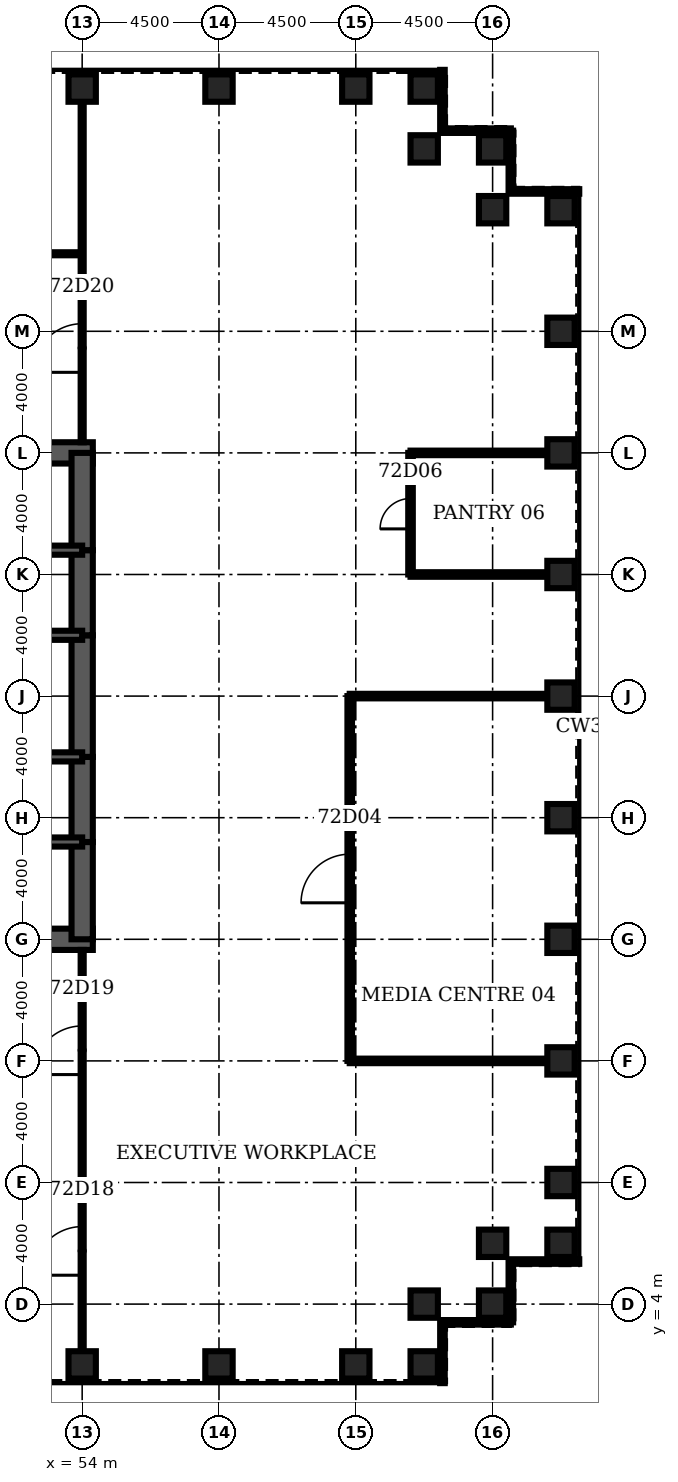
"""IFC4 building model, lengths in metres.
Left out: names, types, materials, properties, quantities, classifications, styles, units other than length and angle.
Written with IfcOpenShell. Run it as: python <this file> out.ifc"""

import sys

from ifc_helpers import new_model, si_unit, direction, frame, frame_2d, origin, origin_2d, place, context, subcontext, project, spatial, rectangle, hollow_rectangle, extrude, element, fill, save


model = new_model("IFC4")
c1 = context("Model", 3, precision=1e-05, world=origin(), true_north=direction((0.0, 1.0)))
c2 = subcontext(c1, "Body", "Model", "MODEL_VIEW")
j1 = project(units=[si_unit("LENGTHUNIT", "METRE"), si_unit("PLANEANGLEUNIT", "RADIAN")], contexts=[c1])
p1 = place(None, origin())
s1 = spatial("IfcSite", under=j1, at=p1, CompositionType="ELEMENT")
p2 = place(p1, origin())
s2 = spatial("IfcBuilding", under=s1, at=p2, CompositionType="ELEMENT")
p3 = place(p2, frame((0.0, 0.0, 317.3)))
s3 = spatial("IfcBuildingStorey", under=s2, at=p3, CompositionType="ELEMENT", Elevation=317.3)
for number, where, z_axis, x_axis in (
    (1, (54.0, 2.0, 0.0), (0.0, 0.0, 1.0), (0.0, 1.0, 0.0)),
    (2, (58.5, 2.0, 0.0), (0.0, 0.0, 1.0), (0.0, 1.0, 0.0)),
    (3, (63.0, 2.0, 0.0), (0.0, 0.0, 1.0), (0.0, 1.0, 0.0)),
    (4, (65.25, 2.0, 0.0), (0.0, 0.0, 1.0), (0.0, 1.0, 0.0)),
    (5, (65.25, 4.0, 0.0), (0.0, 0.0, 1.0), (0.0, 1.0, 0.0)),
    (6, (67.5, 4.0, 0.0), (0.0, 0.0, 1.0), (1.0, 0.0, 0.0)),
    (7, (67.5, 6.0, 0.0), (0.0, 0.0, 1.0), (1.0, 0.0, 0.0)),
    (8, (69.75, 6.0, 0.0), (0.0, 0.0, 1.0), (1.0, 0.0, 0.0)),
    (9, (69.75, 8.0, 0.0), (0.0, 0.0, 1.0), (1.0, 0.0, 0.0)),
    (10, (69.75, 12.0, 0.0), (0.0, 0.0, 1.0), (1.0, 0.0, 0.0)),
    (11, (69.75, 16.0, 0.0), (0.0, 0.0, 1.0), (1.0, 0.0, 0.0)),
    (12, (69.75, 20.0, 0.0), (0.0, 0.0, 1.0), (1.0, 0.0, 0.0)),
    (13, (69.75, 24.0, 0.0), (0.0, 0.0, 1.0), (1.0, 0.0, 0.0)),
    (14, (69.75, 28.0, 0.0), (0.0, 0.0, 1.0), (1.0, 0.0, 0.0)),
    (15, (69.75, 32.0, 0.0), (0.0, 0.0, 1.0), (1.0, 0.0, 0.0)),
    (16, (69.75, 36.0, 0.0), (0.0, 0.0, 1.0), (1.0, 0.0, 0.0)),
    (17, (69.75, 40.0, 0.0), (0.0, 0.0, 1.0), (1.0, 0.0, 0.0)),
    (18, (67.5, 40.0, 0.0), (0.0, 0.0, 1.0), (1.0, 0.0, 0.0)),
    (19, (67.5, 42.0, 0.0), (0.0, 0.0, 1.0), (1.0, 0.0, 0.0)),
    (20, (65.25, 42.0, 0.0), (0.0, 0.0, 1.0), (0.0, 1.0, 0.0)),
    (21, (65.25, 44.0, 0.0), (0.0, 0.0, 1.0), (0.0, 1.0, 0.0)),
    (22, (63.0, 44.0, 0.0), (0.0, 0.0, 1.0), (0.0, 1.0, 0.0)),
    (23, (58.5, 44.0, 0.0), (0.0, 0.0, 1.0), (0.0, 1.0, 0.0)),
    (24, (54.0, 44.0, 0.0), (0.0, 0.0, 1.0), (0.0, 1.0, 0.0)),
):
    element("IfcColumn", number, at=place(p3, frame(where, z_axis=z_axis, x_axis=x_axis)), inside=s3, PredefinedType="COLUMN", context=c2, shape_type="SweptSolid", body=[
        extrude(hollow_rectangle(XDim=0.9, YDim=0.9, WallThickness=0.05, at=origin_2d()), origin(), (0.0, 0.0, 1.0), 4.2),
    ])
for number, where, z_axis, x_axis in (
    (25, (45.0, 16.0, 0.0), (0.0, 0.0, 1.0), (1.0, 0.0, 0.0)),
    (26, (54.35, 32.0, 0.0), (0.0, 0.0, 1.0), (-1.0, 0.0, 0.0)),
):
    element("IfcWall", number, at=place(p3, frame(where, z_axis=z_axis, x_axis=x_axis)), inside=s3, PredefinedType="SHEAR", context=c2, shape_type="SweptSolid", body=[
        extrude(rectangle(XDim=9.35, YDim=0.7, at=frame_2d((4.675, 0.0))), origin(), (0.0, 0.0, 1.0), 4.2),
    ])
p4 = place(p3, frame((54.0, 16.0, 0.0), z_axis=(0.0, 0.0, 1.0), x_axis=(0.0, 1.0, 0.0)))
e27 = element("IfcWall", 27, at=p4, inside=s3, PredefinedType="SHEAR", context=c2, shape_type="SweptSolid", body=[
    extrude(rectangle(XDim=3.2, YDim=0.7, at=frame_2d((1.6, 0.0))), origin(), (0.0, 0.0, 1.0), 4.2),
])
p5 = place(p3, frame((54.0, 19.2, 0.0), z_axis=(0.0, 0.0, 1.0), x_axis=(0.0, 1.0, 0.0)))
e28 = element("IfcWall", 28, at=p5, inside=s3, PredefinedType="SHEAR", context=c2, shape_type="SweptSolid", body=[
    extrude(rectangle(XDim=2.8, YDim=0.7, at=frame_2d((1.4, 0.0))), origin(), (0.0, 0.0, 1.0), 4.2),
])
p6 = place(p5, frame((0.4, 0.0, 0.0)))
e29 = element("IfcOpeningElement", 29, at=p6, cuts=e28, PredefinedType="OPENING", context=c2, shape_type="SweptSolid", body=[
    extrude(rectangle(XDim=1.8, YDim=2.1, at=frame_2d((0.9, 1.05))), frame((0.0, 0.36, 0.0), z_axis=(0.0, -1.0, 0.0), x_axis=(1.0, 0.0, 0.0)), (0.0, 0.0, 1.0), 0.72),
])
p7 = place(p3, frame((54.0, 22.0, 0.0), z_axis=(0.0, 0.0, 1.0), x_axis=(0.0, 1.0, 0.0)))
e30 = element("IfcWall", 30, at=p7, inside=s3, PredefinedType="SHEAR", context=c2, shape_type="SweptSolid", body=[
    extrude(rectangle(XDim=4.0, YDim=0.7, at=frame_2d((2.0, 0.0))), origin(), (0.0, 0.0, 1.0), 4.2),
])
p8 = place(p3, frame((54.0, 26.0, 0.0), z_axis=(0.0, 0.0, 1.0), x_axis=(0.0, 1.0, 0.0)))
e31 = element("IfcWall", 31, at=p8, inside=s3, PredefinedType="SHEAR", context=c2, shape_type="SweptSolid", body=[
    extrude(rectangle(XDim=2.8, YDim=0.7, at=frame_2d((1.4, 0.0))), origin(), (0.0, 0.0, 1.0), 4.2),
])
p9 = place(p8, frame((0.6, 0.0, 0.0)))
e32 = element("IfcOpeningElement", 32, at=p9, cuts=e31, PredefinedType="OPENING", context=c2, shape_type="SweptSolid", body=[
    extrude(rectangle(XDim=1.8, YDim=2.1, at=frame_2d((0.9, 1.05))), frame((0.0, 0.36, 0.0), z_axis=(0.0, -1.0, 0.0), x_axis=(1.0, 0.0, 0.0)), (0.0, 0.0, 1.0), 0.72),
])
p10 = place(p3, frame((54.0, 28.8, 0.0), z_axis=(0.0, 0.0, 1.0), x_axis=(0.0, 1.0, 0.0)))
e33 = element("IfcWall", 33, at=p10, inside=s3, PredefinedType="SHEAR", context=c2, shape_type="SweptSolid", body=[
    extrude(rectangle(XDim=3.2, YDim=0.7, at=frame_2d((1.6, 0.0))), origin(), (0.0, 0.0, 1.0), 4.2),
])
p11 = place(p3, frame((45.0, 19.2, 0.0), z_axis=(0.0, 0.0, 1.0), x_axis=(1.0, 0.0, 0.0)))
e34 = element("IfcWall", 34, at=p11, inside=s3, PredefinedType="SOLIDWALL", context=c2, shape_type="SweptSolid", body=[
    extrude(rectangle(XDim=9.0, YDim=0.3, at=frame_2d((4.5, 0.0))), origin(), (0.0, 0.0, 1.0), 4.2),
])
p12 = place(p11, frame((7.35, 0.0, 0.0)))
e35 = element("IfcOpeningElement", 35, at=p12, cuts=e34, PredefinedType="OPENING", context=c2, shape_type="SweptSolid", body=[
    extrude(rectangle(XDim=1.0, YDim=2.1, at=frame_2d((0.5, 1.05))), frame((0.0, 0.16, 0.0), z_axis=(0.0, -1.0, 0.0), x_axis=(1.0, 0.0, 0.0)), (0.0, 0.0, 1.0), 0.32),
])
p13 = place(p3, frame((45.0, 28.8, 0.0), z_axis=(0.0, 0.0, 1.0), x_axis=(1.0, 0.0, 0.0)))
e36 = element("IfcWall", 36, at=p13, inside=s3, PredefinedType="SOLIDWALL", context=c2, shape_type="SweptSolid", body=[
    extrude(rectangle(XDim=9.0, YDim=0.3, at=frame_2d((4.5, 0.0))), origin(), (0.0, 0.0, 1.0), 4.2),
])
p14 = place(p13, frame((7.35, 0.0, 0.0)))
e37 = element("IfcOpeningElement", 37, at=p14, cuts=e36, PredefinedType="OPENING", context=c2, shape_type="SweptSolid", body=[
    extrude(rectangle(XDim=1.0, YDim=2.1, at=frame_2d((0.5, 1.05))), frame((0.0, 0.16, 0.0), z_axis=(0.0, -1.0, 0.0), x_axis=(1.0, 0.0, 0.0)), (0.0, 0.0, 1.0), 0.32),
])
p15 = place(p3, frame((48.0, 22.0, 0.0), z_axis=(0.0, 0.0, 1.0), x_axis=(1.0, 0.0, 0.0)))
e38 = element("IfcWall", 38, at=p15, inside=s3, PredefinedType="SOLIDWALL", context=c2, shape_type="SweptSolid", body=[
    extrude(rectangle(XDim=6.0, YDim=0.3, at=frame_2d((3.0, 0.0))), origin(), (0.0, 0.0, 1.0), 4.2),
])
p16 = place(p15, frame((2.0, 0.0, 0.0)))
e39 = element("IfcOpeningElement", 39, at=p16, cuts=e38, PredefinedType="OPENING", context=c2, shape_type="SweptSolid", body=[
    extrude(rectangle(XDim=1.0, YDim=2.1, at=frame_2d((0.5, 1.05))), frame((0.0, 0.16, 0.0), z_axis=(0.0, -1.0, 0.0), x_axis=(1.0, 0.0, 0.0)), (0.0, 0.0, 1.0), 0.32),
])
p17 = place(p15, frame((4.1, 0.0, 0.0)))
e40 = element("IfcOpeningElement", 40, at=p17, cuts=e38, PredefinedType="OPENING", context=c2, shape_type="SweptSolid", body=[
    extrude(rectangle(XDim=1.0, YDim=2.1, at=frame_2d((0.5, 1.05))), frame((0.0, 0.16, 0.0), z_axis=(0.0, -1.0, 0.0), x_axis=(1.0, 0.0, 0.0)), (0.0, 0.0, 1.0), 0.32),
])
p18 = place(p3, frame((48.0, 26.0, 0.0), z_axis=(0.0, 0.0, 1.0), x_axis=(1.0, 0.0, 0.0)))
e41 = element("IfcWall", 41, at=p18, inside=s3, PredefinedType="SOLIDWALL", context=c2, shape_type="SweptSolid", body=[
    extrude(rectangle(XDim=6.0, YDim=0.3, at=frame_2d((3.0, 0.0))), origin(), (0.0, 0.0, 1.0), 4.2),
])
for number, where, z_axis, x_axis in (
    (42, (62.8, 12.0, 0.0), (0.0, 0.0, 1.0), (1.0, 0.0, 0.0)),
    (43, (62.8, 24.0, 0.0), (0.0, 0.0, 1.0), (1.0, 0.0, 0.0)),
):
    element("IfcWall", number, at=place(p3, frame(where, z_axis=z_axis, x_axis=x_axis)), inside=s3, PredefinedType="PARTITIONING", context=c2, shape_type="SweptSolid", body=[
        extrude(rectangle(XDim=6.5, YDim=0.15, at=frame_2d((3.25, 0.0))), origin(), (0.0, 0.0, 1.0), 3.0),
    ])
for number, where, z_axis, x_axis in (
    (44, (64.8, 28.0, 0.0), (0.0, 0.0, 1.0), (1.0, 0.0, 0.0)),
    (45, (64.8, 32.0, 0.0), (0.0, 0.0, 1.0), (1.0, 0.0, 0.0)),
):
    element("IfcWall", number, at=place(p3, frame(where, z_axis=z_axis, x_axis=x_axis)), inside=s3, PredefinedType="PARTITIONING", context=c2, shape_type="SweptSolid", body=[
        extrude(rectangle(XDim=4.5, YDim=0.15, at=frame_2d((2.25, 0.0))), origin(), (0.0, 0.0, 1.0), 3.0),
    ])
p19 = place(p3, frame((36.0, 38.55, 0.0), z_axis=(0.0, 0.0, 1.0), x_axis=(1.0, 0.0, 0.0)))
e46 = element("IfcWall", 46, at=p19, inside=s3, PredefinedType="PARTITIONING", context=c2, shape_type="SweptSolid", body=[
    extrude(rectangle(XDim=18.0, YDim=0.1, at=frame_2d((9.0, 0.0))), origin(), (0.0, 0.0, 1.0), 3.0),
])
p20 = place(p19, frame((4.0, 0.0, 0.0)))
e47 = element("IfcOpeningElement", 47, at=p20, cuts=e46, PredefinedType="OPENING", context=c2, shape_type="SweptSolid", body=[
    extrude(rectangle(XDim=1.0, YDim=2.1, at=frame_2d((0.5, 1.05))), frame((0.0, 0.06, 0.0), z_axis=(0.0, -1.0, 0.0), x_axis=(1.0, 0.0, 0.0)), (0.0, 0.0, 1.0), 0.12),
])
p21 = place(p19, frame((13.0, 0.0, 0.0)))
e48 = element("IfcOpeningElement", 48, at=p21, cuts=e46, PredefinedType="OPENING", context=c2, shape_type="SweptSolid", body=[
    extrude(rectangle(XDim=1.0, YDim=2.1, at=frame_2d((0.5, 1.05))), frame((0.0, 0.06, 0.0), z_axis=(0.0, -1.0, 0.0), x_axis=(1.0, 0.0, 0.0)), (0.0, 0.0, 1.0), 0.12),
])
p22 = place(p3, frame((54.0, 2.45, 0.0), z_axis=(0.0, 0.0, 1.0), x_axis=(0.0, 1.0, 0.0)))
e49 = element("IfcWall", 49, at=p22, inside=s3, PredefinedType="PARTITIONING", context=c2, shape_type="SweptSolid", body=[
    extrude(rectangle(XDim=13.2, YDim=0.1, at=frame_2d((6.6, 0.0))), origin(), (0.0, 0.0, 1.0), 3.0),
])
p23 = place(p22, frame((2.5, 0.0, 0.0)))
e50 = element("IfcOpeningElement", 50, at=p23, cuts=e49, PredefinedType="OPENING", context=c2, shape_type="SweptSolid", body=[
    extrude(rectangle(XDim=1.6, YDim=2.1, at=frame_2d((0.8, 1.05))), frame((0.0, 0.06, 0.0), z_axis=(0.0, -1.0, 0.0), x_axis=(1.0, 0.0, 0.0)), (0.0, 0.0, 1.0), 0.12),
])
p24 = place(p22, frame((9.1, 0.0, 0.0)))
e51 = element("IfcOpeningElement", 51, at=p24, cuts=e49, PredefinedType="OPENING", context=c2, shape_type="SweptSolid", body=[
    extrude(rectangle(XDim=1.6, YDim=2.1, at=frame_2d((0.8, 1.05))), frame((0.0, 0.06, 0.0), z_axis=(0.0, -1.0, 0.0), x_axis=(1.0, 0.0, 0.0)), (0.0, 0.0, 1.0), 0.12),
])
p25 = place(p3, frame((54.0, 32.35, 0.0), z_axis=(0.0, 0.0, 1.0), x_axis=(0.0, 1.0, 0.0)))
e52 = element("IfcWall", 52, at=p25, inside=s3, PredefinedType="PARTITIONING", context=c2, shape_type="SweptSolid", body=[
    extrude(rectangle(XDim=11.2, YDim=0.1, at=frame_2d((5.6, 0.0))), origin(), (0.0, 0.0, 1.0), 3.0),
])
p26 = place(p25, frame((2.3, 0.0, 0.0)))
e53 = element("IfcOpeningElement", 53, at=p26, cuts=e52, PredefinedType="OPENING", context=c2, shape_type="SweptSolid", body=[
    extrude(rectangle(XDim=1.6, YDim=2.1, at=frame_2d((0.8, 1.05))), frame((0.0, 0.06, 0.0), z_axis=(0.0, -1.0, 0.0), x_axis=(1.0, 0.0, 0.0)), (0.0, 0.0, 1.0), 0.12),
])
p27 = place(p3, frame((62.8, 12.0, 0.0), z_axis=(0.0, 0.0, 1.0), x_axis=(0.0, 1.0, 0.0)))
e54 = element("IfcWall", 54, at=p27, inside=s3, PredefinedType="PARTITIONING", context=c2, shape_type="SweptSolid", body=[
    extrude(rectangle(XDim=12.0, YDim=0.15, at=frame_2d((6.0, 0.0))), origin(), (0.0, 0.0, 1.0), 3.0),
])
p28 = place(p27, frame((5.2, 0.0, 0.0)))
e55 = element("IfcOpeningElement", 55, at=p28, cuts=e54, PredefinedType="OPENING", context=c2, shape_type="SweptSolid", body=[
    extrude(rectangle(XDim=1.6, YDim=2.1, at=frame_2d((0.8, 1.05))), frame((0.0, 0.085, 0.0), z_axis=(0.0, -1.0, 0.0), x_axis=(1.0, 0.0, 0.0)), (0.0, 0.0, 1.0), 0.17),
])
p29 = place(p3, frame((64.8, 28.0, 0.0), z_axis=(0.0, 0.0, 1.0), x_axis=(0.0, 1.0, 0.0)))
e56 = element("IfcWall", 56, at=p29, inside=s3, PredefinedType="PARTITIONING", context=c2, shape_type="SweptSolid", body=[
    extrude(rectangle(XDim=4.0, YDim=0.15, at=frame_2d((2.0, 0.0))), origin(), (0.0, 0.0, 1.0), 3.0),
])
p30 = place(p29, frame((1.5, 0.0, 0.0)))
e57 = element("IfcOpeningElement", 57, at=p30, cuts=e56, PredefinedType="OPENING", context=c2, shape_type="SweptSolid", body=[
    extrude(rectangle(XDim=1.0, YDim=2.1, at=frame_2d((0.5, 1.05))), frame((0.0, 0.085, 0.0), z_axis=(0.0, -1.0, 0.0), x_axis=(1.0, 0.0, 0.0)), (0.0, 0.0, 1.0), 0.17),
])
p31 = place(p3, frame((65.85, 1.4, 0.0), z_axis=(0.0, 0.0, 1.0), x_axis=(0.0, 1.0, 0.0)))
e58 = element("IfcWall", 58, at=p31, inside=s3, PredefinedType="ELEMENTEDWALL", context=c2, shape_type="SweptSolid", body=[
    extrude(rectangle(XDim=2.0, YDim=0.15, at=frame_2d((1.0, 0.0))), origin(), (0.0, 0.0, 1.0), 4.04),
])
p32 = place(p3, frame((65.85, 3.4, 0.0), z_axis=(0.0, 0.0, 1.0), x_axis=(1.0, 0.0, 0.0)))
e59 = element("IfcWall", 59, at=p32, inside=s3, PredefinedType="ELEMENTEDWALL", context=c2, shape_type="SweptSolid", body=[
    extrude(rectangle(XDim=2.25, YDim=0.15, at=frame_2d((1.125, 0.0))), origin(), (0.0, 0.0, 1.0), 4.04),
])
p33 = place(p3, frame((68.1, 3.4, 0.0), z_axis=(0.0, 0.0, 1.0), x_axis=(0.0, 1.0, 0.0)))
e60 = element("IfcWall", 60, at=p33, inside=s3, PredefinedType="ELEMENTEDWALL", context=c2, shape_type="SweptSolid", body=[
    extrude(rectangle(XDim=2.0, YDim=0.15, at=frame_2d((1.0, 0.0))), origin(), (0.0, 0.0, 1.0), 4.04),
])
for number, where, z_axis, x_axis in (
    (61, (68.1, 5.4, 0.0), (0.0, 0.0, 1.0), (1.0, 0.0, 0.0)),
    (62, (70.35, 40.6, 0.0), (0.0, 0.0, 1.0), (-1.0, 0.0, 0.0)),
):
    element("IfcWall", number, at=place(p3, frame(where, z_axis=z_axis, x_axis=x_axis)), inside=s3, PredefinedType="ELEMENTEDWALL", context=c2, shape_type="SweptSolid", body=[
        extrude(rectangle(XDim=2.25, YDim=0.15, at=frame_2d((1.125, 0.0))), origin(), (0.0, 0.0, 1.0), 4.04),
    ])
p34 = place(p3, frame((68.1, 40.6, 0.0), z_axis=(0.0, 0.0, 1.0), x_axis=(0.0, 1.0, 0.0)))
e63 = element("IfcWall", 63, at=p34, inside=s3, PredefinedType="ELEMENTEDWALL", context=c2, shape_type="SweptSolid", body=[
    extrude(rectangle(XDim=2.0, YDim=0.15, at=frame_2d((1.0, 0.0))), origin(), (0.0, 0.0, 1.0), 4.04),
])
p35 = place(p3, frame((68.1, 42.6, 0.0), z_axis=(0.0, 0.0, 1.0), x_axis=(-1.0, 0.0, 0.0)))
e64 = element("IfcWall", 64, at=p35, inside=s3, PredefinedType="ELEMENTEDWALL", context=c2, shape_type="SweptSolid", body=[
    extrude(rectangle(XDim=2.25, YDim=0.15, at=frame_2d((1.125, 0.0))), origin(), (0.0, 0.0, 1.0), 4.04),
])
p36 = place(p3, frame((65.85, 42.6, 0.0), z_axis=(0.0, 0.0, 1.0), x_axis=(0.0, 1.0, 0.0)))
e65 = element("IfcWall", 65, at=p36, inside=s3, PredefinedType="ELEMENTEDWALL", context=c2, shape_type="SweptSolid", body=[
    extrude(rectangle(XDim=2.0, YDim=0.15, at=frame_2d((1.0, 0.0))), origin(), (0.0, 0.0, 1.0), 4.04),
])
p37 = place(p28, origin())
e66 = element("IfcDoor", 66, at=p37, inside=s3, OperationType="SINGLE_SWING_LEFT", PredefinedType="DOOR", context=c2, shape_type="SweptSolid", body=[
    extrude(rectangle(XDim=1.6, YDim=2.1, at=frame_2d((0.8, 1.05))), frame((0.0, 0.025, 0.0), z_axis=(0.0, -1.0, 0.0), x_axis=(1.0, 0.0, 0.0)), (0.0, 0.0, 1.0), 0.05),
])
fill(e55, e66)
p38 = place(p30, origin())
e67 = element("IfcDoor", 67, at=p38, inside=s3, OperationType="SINGLE_SWING_LEFT", PredefinedType="DOOR", context=c2, shape_type="SweptSolid", body=[
    extrude(rectangle(XDim=1.0, YDim=2.1, at=frame_2d((0.5, 1.05))), frame((0.0, 0.025, 0.0), z_axis=(0.0, -1.0, 0.0), x_axis=(1.0, 0.0, 0.0)), (0.0, 0.0, 1.0), 0.05),
])
fill(e57, e67)
p39 = place(p23, origin())
e68 = element("IfcDoor", 68, at=p39, inside=s3, OperationType="SINGLE_SWING_LEFT", PredefinedType="DOOR", context=c2, shape_type="SweptSolid", body=[
    extrude(rectangle(XDim=1.6, YDim=2.1, at=frame_2d((0.8, 1.05))), frame((0.0, 0.025, 0.0), z_axis=(0.0, -1.0, 0.0), x_axis=(1.0, 0.0, 0.0)), (0.0, 0.0, 1.0), 0.05),
])
fill(e50, e68)
p40 = place(p24, origin())
e69 = element("IfcDoor", 69, at=p40, inside=s3, OperationType="SINGLE_SWING_LEFT", PredefinedType="DOOR", context=c2, shape_type="SweptSolid", body=[
    extrude(rectangle(XDim=1.6, YDim=2.1, at=frame_2d((0.8, 1.05))), frame((0.0, 0.025, 0.0), z_axis=(0.0, -1.0, 0.0), x_axis=(1.0, 0.0, 0.0)), (0.0, 0.0, 1.0), 0.05),
])
fill(e51, e69)
p41 = place(p26, origin())
e70 = element("IfcDoor", 70, at=p41, inside=s3, OperationType="SINGLE_SWING_LEFT", PredefinedType="DOOR", context=c2, shape_type="SweptSolid", body=[
    extrude(rectangle(XDim=1.6, YDim=2.1, at=frame_2d((0.8, 1.05))), frame((0.0, 0.025, 0.0), z_axis=(0.0, -1.0, 0.0), x_axis=(1.0, 0.0, 0.0)), (0.0, 0.0, 1.0), 0.05),
])
fill(e53, e70)
p42 = place(p12, origin())
e71 = element("IfcDoor", 71, at=p42, inside=s3, OperationType="SINGLE_SWING_RIGHT", PredefinedType="DOOR", context=c2, shape_type="SweptSolid", body=[
    extrude(rectangle(XDim=1.0, YDim=2.1, at=frame_2d((0.5, 1.05))), frame((0.0, 0.025, 0.0), z_axis=(0.0, -1.0, 0.0), x_axis=(1.0, 0.0, 0.0)), (0.0, 0.0, 1.0), 0.05),
])
fill(e35, e71)
p43 = place(p14, origin())
e72 = element("IfcDoor", 72, at=p43, inside=s3, OperationType="SINGLE_SWING_RIGHT", PredefinedType="DOOR", context=c2, shape_type="SweptSolid", body=[
    extrude(rectangle(XDim=1.0, YDim=2.1, at=frame_2d((0.5, 1.05))), frame((0.0, 0.025, 0.0), z_axis=(0.0, -1.0, 0.0), x_axis=(1.0, 0.0, 0.0)), (0.0, 0.0, 1.0), 0.05),
])
fill(e37, e72)
p44 = place(p6, origin())
e73 = element("IfcDoor", 73, at=p44, inside=s3, OperationType="SINGLE_SWING_LEFT", PredefinedType="DOOR", context=c2, shape_type="SweptSolid", body=[
    extrude(rectangle(XDim=1.8, YDim=2.1, at=frame_2d((0.9, 1.05))), frame((0.0, 0.35, 0.0), z_axis=(0.0, -1.0, 0.0), x_axis=(1.0, 0.0, 0.0)), (0.0, 0.0, 1.0), 0.699),
])
fill(e29, e73)
p45 = place(p9, origin())
e74 = element("IfcDoor", 74, at=p45, inside=s3, OperationType="SINGLE_SWING_LEFT", PredefinedType="DOOR", context=c2, shape_type="SweptSolid", body=[
    extrude(rectangle(XDim=1.8, YDim=2.1, at=frame_2d((0.9, 1.05))), frame((0.0, 0.35, 0.0), z_axis=(0.0, -1.0, 0.0), x_axis=(1.0, 0.0, 0.0)), (0.0, 0.0, 1.0), 0.699),
])
fill(e32, e74)
p46 = place(p17, origin())
e75 = element("IfcDoor", 75, at=p46, inside=s3, OperationType="SINGLE_SWING_RIGHT", PredefinedType="DOOR", context=c2, shape_type="SweptSolid", body=[
    extrude(rectangle(XDim=1.0, YDim=2.1, at=frame_2d((0.5, 1.05))), frame((0.0, 0.025, 0.0), z_axis=(0.0, -1.0, 0.0), x_axis=(1.0, 0.0, 0.0)), (0.0, 0.0, 1.0), 0.05),
])
fill(e40, e75)
save(model, sys.argv[1])
